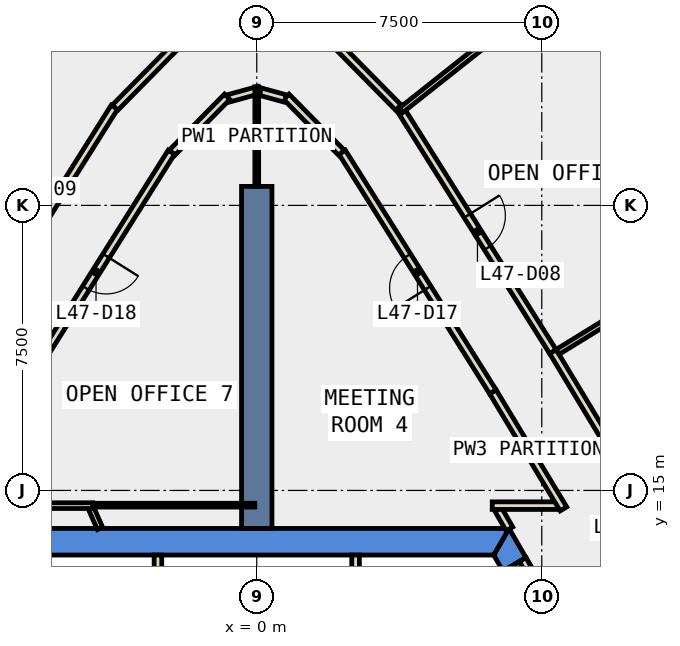
"""IFC4 building model, lengths in metres.
Left out: names, types, materials, properties, quantities, classifications, styles, units other than length and angle.
Written with IfcOpenShell. Run it as: python <this file> out.ifc"""

import sys

from ifc_helpers import new_model, si_unit, direction, frame, frame_2d, origin, place, context, subcontext, project, spatial, polyline, rectangle, outline, extrude, element, fill, save


model = new_model("IFC4")
c1 = context("Model", 3, precision=1e-05, world=origin(), true_north=direction((0.0, 1.0)))
c2 = subcontext(c1, "Body", "Model", "MODEL_VIEW")
j1 = project(units=[si_unit("LENGTHUNIT", "METRE"), si_unit("PLANEANGLEUNIT", "RADIAN")], contexts=[c1])
p1 = place(None, origin())
s1 = spatial("IfcSite", under=j1, at=p1, CompositionType="ELEMENT")
p2 = place(p1, origin())
s2 = spatial("IfcBuilding", under=s1, at=p2, CompositionType="ELEMENT")
p3 = place(p2, frame((0.0, 0.0, 210.8)))
s3 = spatial("IfcBuildingStorey", under=s2, at=p3, CompositionType="ELEMENT", Elevation=210.8)
p4 = place(p3, frame((0.0, 0.0, -0.4)))
e1 = element("IfcWall", 1, at=p4, inside=s3, PredefinedType="SHEAR", context=c2, shape_type="SweptSolid", body=[
    extrude(outline(polyline([(6.478, 12.88), (7.084, 13.23), (6.64, 14.0), (6.235, 13.3), (6.478, 12.88)])), origin(), (0.0, 0.0, 1.0), 4.2),
])
p5 = place(p3, frame((0.0, 0.0, 3.6)))
e2 = element("IfcWall", 2, at=p5, inside=s3, PredefinedType="SHEAR", context=c2, shape_type="SweptSolid", body=[
    extrude(outline(polyline([(7.084, 13.23), (6.478, 12.88), (7.478, 11.148), (8.084, 11.498), (7.084, 13.23)])), origin(), (0.0, 0.0, 1.0), 0.2),
])
p6 = place(p3, frame((0.0, 0.0, -0.4)))
e3 = element("IfcWall", 3, at=p6, inside=s3, PredefinedType="SHEAR", context=c2, shape_type="SweptSolid", body=[
    extrude(outline(polyline([(6.64, 14.0), (-6.64, 14.0), (-6.235, 13.3), (6.235, 13.3), (6.64, 14.0)])), origin(), (0.0, 0.0, 1.0), 4.2),
])
p7 = place(p3, frame((0.0, 14.0, -0.4), z_axis=(0.0, 0.0, 1.0), x_axis=(0.0, 1.0, 0.0)))
e4 = element("IfcWall", 4, at=p7, inside=s3, PredefinedType="SHEAR", context=c2, shape_type="SweptSolid", body=[
    extrude(rectangle(XDim=9.0, YDim=0.8, at=frame_2d((4.5, 0.0))), origin(), (0.0, 0.0, 1.0), 4.2),
])
p8 = place(p3, frame((12.632, 22.134, 0.0), z_axis=(0.0, 0.0, 1.0), x_axis=(-0.532522107002, 0.84641609481, 0.0)))
e5 = element("IfcWall", 5, at=p8, inside=s3, PredefinedType="STANDARD", context=c2, shape_type="SweptSolid", body=[
    extrude(rectangle(XDim=7.273, YDim=0.3, at=frame_2d((3.636, 0.0))), origin(), (0.0, 0.0, 1.0), 3.8),
])
p9 = place(p8, frame((0.618, 0.0, 0.9)))
e6 = element("IfcOpeningElement", 6, at=p9, cuts=e5, PredefinedType="OPENING", context=c2, shape_type="SweptSolid", body=[
    extrude(rectangle(XDim=2.4, YDim=2.6, at=frame_2d((1.2, 1.3))), frame((0.0, 0.16, 0.0), z_axis=(0.0, -1.0, 0.0), x_axis=(1.0, 0.0, 0.0)), (0.0, 0.0, 1.0), 0.32),
])
p10 = place(p8, frame((4.255, 0.0, 0.9)))
e7 = element("IfcOpeningElement", 7, at=p10, cuts=e5, PredefinedType="OPENING", context=c2, shape_type="SweptSolid", body=[
    extrude(rectangle(XDim=2.4, YDim=2.6, at=frame_2d((1.2, 1.3))), frame((0.0, 0.16, 0.0), z_axis=(0.0, -1.0, 0.0), x_axis=(1.0, 0.0, 0.0)), (0.0, 0.0, 1.0), 0.32),
])
p11 = place(p3, frame((6.649, 13.988, 0.0), z_axis=(0.0, 0.0, 1.0), x_axis=(-0.499908430952, 0.866078264744, 0.0)))
e8 = element("IfcWall", 8, at=p11, inside=s3, PredefinedType="PARTITIONING", context=c2, shape_type="SweptSolid", body=[
    extrude(rectangle(XDim=0.606, YDim=0.2, at=frame_2d((0.303, 0.0))), origin(), (0.0, 0.0, 1.0), 3.8),
])
p12 = place(p3, frame((6.196, 14.6, 0.0), z_axis=(0.0, 0.0, 1.0), x_axis=(1.0, 0.0, 0.0)))
e9 = element("IfcWall", 9, at=p12, inside=s3, PredefinedType="PARTITIONING", context=c2, shape_type="SweptSolid", body=[
    extrude(rectangle(XDim=1.722, YDim=0.2, at=frame_2d((0.861, 0.0))), origin(), (0.0, 0.0, 1.0), 3.8),
])
p13 = place(p3, frame((8.07, 14.514, 0.0), z_axis=(0.0, 0.0, 1.0), x_axis=(-0.51624118739, 0.856443247648, 0.0)))
e10 = element("IfcWall", 10, at=p13, inside=s3, PredefinedType="PARTITIONING", context=c2, shape_type="SweptSolid", body=[
    extrude(rectangle(XDim=3.597, YDim=0.2, at=frame_2d((1.799, 0.0))), origin(), (0.0, 0.0, 1.0), 3.8),
])
p14 = place(p3, frame((6.213, 17.595, 0.0), z_axis=(0.0, 0.0, 1.0), x_axis=(-0.532527247309, 0.846412860768, 0.0)))
e11 = element("IfcWall", 11, at=p14, inside=s3, PredefinedType="PARTITIONING", context=c2, shape_type="SweptSolid", body=[
    extrude(rectangle(XDim=7.449, YDim=0.2, at=frame_2d((3.725, 0.0))), origin(), (0.0, 0.0, 1.0), 3.8),
])
p15 = place(p14, frame((3.225, 0.0, 0.0)))
e12 = element("IfcOpeningElement", 12, at=p15, cuts=e11, PredefinedType="OPENING", context=c2, shape_type="SweptSolid", body=[
    extrude(rectangle(XDim=1.0, YDim=2.1, at=frame_2d((0.5, 1.05))), frame((0.0, 0.11, 0.0), z_axis=(0.0, -1.0, 0.0), x_axis=(1.0, 0.0, 0.0)), (0.0, 0.0, 1.0), 0.22),
])
p16 = place(p3, frame((2.229, 23.887, 0.0), z_axis=(0.0, 0.0, 1.0), x_axis=(-0.702245482258, 0.711934886523, 0.0)))
e13 = element("IfcWall", 13, at=p16, inside=s3, PredefinedType="PARTITIONING", context=c2, shape_type="SweptSolid", body=[
    extrude(rectangle(XDim=2.066, YDim=0.2, at=frame_2d((1.033, 0.0))), origin(), (0.0, 0.0, 1.0), 3.8),
])
p17 = place(p3, frame((0.752, 25.313, 0.0), z_axis=(0.0, 0.0, 1.0), x_axis=(-0.964381816756, 0.264514104559, 0.0)))
e14 = element("IfcWall", 14, at=p17, inside=s3, PredefinedType="PARTITIONING", context=c2, shape_type="SweptSolid", body=[
    extrude(rectangle(XDim=0.68, YDim=0.2, at=frame_2d((0.34, 0.0))), origin(), (0.0, 0.0, 1.0), 3.8),
])
p18 = place(p3, frame((0.048, 25.533, 0.0), z_axis=(0.0, 0.0, 1.0), x_axis=(-0.964218556253, -0.265108611286, 0.0)))
e15 = element("IfcWall", 15, at=p18, inside=s3, PredefinedType="PARTITIONING", context=c2, shape_type="SweptSolid", body=[
    extrude(rectangle(XDim=0.83, YDim=0.2, at=frame_2d((0.415, 0.0))), origin(), (0.0, 0.0, 1.0), 3.8),
])
p19 = place(p3, frame((-0.778, 25.358, 0.0), z_axis=(0.0, 0.0, 1.0), x_axis=(-0.702245482258, -0.711934886523, 0.0)))
e16 = element("IfcWall", 16, at=p19, inside=s3, PredefinedType="PARTITIONING", context=c2, shape_type="SweptSolid", body=[
    extrude(rectangle(XDim=2.066, YDim=0.2, at=frame_2d((1.033, 0.0))), origin(), (0.0, 0.0, 1.0), 3.8),
])
p20 = place(p3, frame((-2.246, 23.9, 0.0), z_axis=(0.0, 0.0, 1.0), x_axis=(-0.532527247309, -0.846412860768, 0.0)))
e17 = element("IfcWall", 17, at=p20, inside=s3, PredefinedType="PARTITIONING", context=c2, shape_type="SweptSolid", body=[
    extrude(rectangle(XDim=7.449, YDim=0.2, at=frame_2d((3.725, 0.0))), origin(), (0.0, 0.0, 1.0), 3.8),
])
p21 = place(p20, frame((3.225, 0.0, 0.0)))
e18 = element("IfcOpeningElement", 18, at=p21, cuts=e17, PredefinedType="OPENING", context=c2, shape_type="SweptSolid", body=[
    extrude(rectangle(XDim=1.0, YDim=2.1, at=frame_2d((0.5, 1.05))), frame((0.0, 0.11, 0.0), z_axis=(0.0, -1.0, 0.0), x_axis=(1.0, 0.0, 0.0)), (0.0, 0.0, 1.0), 0.22),
])
p22 = place(p3, frame((7.792, 18.655, 0.0), z_axis=(0.0, 0.0, 1.0), x_axis=(0.516293428925, -0.856411755669, 0.0)))
e19 = element("IfcWall", 19, at=p22, inside=s3, PredefinedType="PARTITIONING", context=c2, shape_type="SweptSolid", body=[
    extrude(rectangle(XDim=8.124, YDim=0.2, at=frame_2d((4.062, 0.0))), origin(), (0.0, 0.0, 1.0), 3.8),
])
p23 = place(p22, frame((3.637, 0.0, 0.0)))
e20 = element("IfcOpeningElement", 20, at=p23, cuts=e19, PredefinedType="OPENING", context=c2, shape_type="SweptSolid", body=[
    extrude(rectangle(XDim=1.0, YDim=2.1, at=frame_2d((0.5, 1.05))), frame((0.0, 0.11, 0.0), z_axis=(0.0, -1.0, 0.0), x_axis=(1.0, 0.0, 0.0)), (0.0, 0.0, 1.0), 0.22),
])
p24 = place(p3, frame((3.744, 25.087, 0.0), z_axis=(0.0, 0.0, 1.0), x_axis=(0.532569549341, -0.846386244639, 0.0)))
e21 = element("IfcWall", 21, at=p24, inside=s3, PredefinedType="PARTITIONING", context=c2, shape_type="SweptSolid", body=[
    extrude(rectangle(XDim=7.599, YDim=0.2, at=frame_2d((3.8, 0.0))), origin(), (0.0, 0.0, 1.0), 3.8),
])
p25 = place(p24, frame((3.375, 0.0, 0.0)))
e22 = element("IfcOpeningElement", 22, at=p25, cuts=e21, PredefinedType="OPENING", context=c2, shape_type="SweptSolid", body=[
    extrude(rectangle(XDim=1.0, YDim=2.1, at=frame_2d((0.5, 1.05))), frame((0.0, 0.11, 0.0), z_axis=(0.0, -1.0, 0.0), x_axis=(1.0, 0.0, 0.0)), (0.0, 0.0, 1.0), 0.22),
])
p26 = place(p3, frame((-7.871, 18.528, 0.0), z_axis=(0.0, 0.0, 1.0), x_axis=(0.532587642146, 0.846374859878, 0.0)))
e23 = element("IfcWall", 23, at=p26, inside=s3, PredefinedType="PARTITIONING", context=c2, shape_type="SweptSolid", body=[
    extrude(rectangle(XDim=7.749, YDim=0.2, at=frame_2d((3.875, 0.0))), origin(), (0.0, 0.0, 1.0), 3.8),
])
p27 = place(p26, frame((3.375, 0.0, 0.0)))
e24 = element("IfcOpeningElement", 24, at=p27, cuts=e23, PredefinedType="OPENING", context=c2, shape_type="SweptSolid", body=[
    extrude(rectangle(XDim=1.0, YDim=2.1, at=frame_2d((0.5, 1.05))), frame((0.0, 0.11, 0.0), z_axis=(0.0, -1.0, 0.0), x_axis=(1.0, 0.0, 0.0)), (0.0, 0.0, 1.0), 0.22),
])
for number, where, z_axis, x_axis in (
    (25, (-3.727, 25.074, 0.0), (0.0, 0.0, 1.0), (0.702, 0.712, 0.0)),
    (26, (1.773, 27.056, 0.0), (0.0, 0.0, 1.0), (0.702, -0.712, 0.0)),
):
    element("IfcWall", number, at=place(p3, frame(where, z_axis=z_axis, x_axis=x_axis)), inside=s3, PredefinedType="PARTITIONING", context=c2, shape_type="SweptSolid", body=[
        extrude(rectangle(XDim=2.783, YDim=0.2, at=frame_2d((1.392, 0.0))), origin(), (0.0, 0.0, 1.0), 3.8),
    ])
p28 = place(p3, frame((-2.6, 10.8, 0.0), z_axis=(0.0, 0.0, 1.0), x_axis=(0.0, 1.0, 0.0)))
e27 = element("IfcWall", 27, at=p28, inside=s3, PredefinedType="PARTITIONING", context=c2, shape_type="SweptSolid", body=[
    extrude(rectangle(XDim=2.5, YDim=0.2, at=frame_2d((1.25, 0.0))), origin(), (0.0, 0.0, 1.0), 3.8),
])
p29 = place(p28, frame((0.75, 0.0, 0.0)))
e28 = element("IfcOpeningElement", 28, at=p29, cuts=e27, PredefinedType="OPENING", context=c2, shape_type="SweptSolid", body=[
    extrude(rectangle(XDim=0.9, YDim=2.1, at=frame_2d((0.45, 1.05))), frame((0.0, 0.11, 0.0), z_axis=(0.0, -1.0, 0.0), x_axis=(1.0, 0.0, 0.0)), (0.0, 0.0, 1.0), 0.22),
])
p30 = place(p3, frame((2.6, 13.3, 0.0), z_axis=(0.0, 0.0, 1.0), x_axis=(0.0, -1.0, 0.0)))
e29 = element("IfcWall", 29, at=p30, inside=s3, PredefinedType="PARTITIONING", context=c2, shape_type="SweptSolid", body=[
    extrude(rectangle(XDim=2.5, YDim=0.2, at=frame_2d((1.25, 0.0))), origin(), (0.0, 0.0, 1.0), 3.8),
])
p31 = place(p3, frame((-4.125, 14.0, 0.0), z_axis=(0.0, 0.0, 1.0), x_axis=(-0.404850841056, 0.914382740703, 0.0)))
e30 = element("IfcWall", 30, at=p31, inside=s3, PredefinedType="PARTITIONING", context=c2, shape_type="SweptSolid", body=[
    extrude(rectangle(XDim=0.581, YDim=0.15, at=frame_2d((0.291, 0.0))), origin(), (0.0, 0.0, 1.0), 3.8),
])
p32 = place(p3, frame((-4.316, 14.6, 0.0), z_axis=(0.0, 0.0, 1.0), x_axis=(-1.0, 0.0, 0.0)))
e31 = element("IfcWall", 31, at=p32, inside=s3, PredefinedType="PARTITIONING", context=c2, shape_type="SweptSolid", body=[
    extrude(rectangle(XDim=3.802, YDim=0.15, at=frame_2d((1.901, 0.0))), origin(), (0.0, 0.0, 1.0), 3.8),
])
p33 = place(p3, frame((-4.316, 14.612, 0.0), z_axis=(0.0, 0.0, 1.0), x_axis=(1.0, 0.0, 0.0)))
e32 = element("IfcWall", 32, at=p33, inside=s3, PredefinedType="PARTITIONING", context=c2, shape_type="SweptSolid", body=[
    extrude(rectangle(XDim=4.266, YDim=0.1, at=frame_2d((2.133, 0.0))), origin(), (0.0, 0.0, 1.0), 3.8),
])
p34 = place(p3, frame((0.0, 23.0, 0.0), z_axis=(0.0, 0.0, 1.0), x_axis=(0.0, 1.0, 0.0)))
e33 = element("IfcWall", 33, at=p34, inside=s3, PredefinedType="PARTITIONING", context=c2, shape_type="SweptSolid", body=[
    extrude(rectangle(XDim=2.62, YDim=0.1, at=frame_2d((1.31, 0.0))), origin(), (0.0, 0.0, 1.0), 3.8),
])
p35 = place(p3, frame((7.916, 18.644, 0.0), z_axis=(0.0, 0.0, 1.0), x_axis=(0.851543444049, 0.524284047914, 0.0)))
e34 = element("IfcWall", 34, at=p35, inside=s3, PredefinedType="PARTITIONING", context=c2, shape_type="SweptSolid", body=[
    extrude(rectangle(XDim=4.379, YDim=0.15, at=frame_2d((2.189, 0.0))), origin(), (0.0, 0.0, 1.0), 3.8),
])
p36 = place(p3, frame((3.797, 25.003, 0.0), z_axis=(0.0, 0.0, 1.0), x_axis=(0.783893371826, 0.620895467536, 0.0)))
e35 = element("IfcWall", 35, at=p36, inside=s3, PredefinedType="PARTITIONING", context=c2, shape_type="SweptSolid", body=[
    extrude(rectangle(XDim=4.514, YDim=0.15, at=frame_2d((2.257, 0.0))), origin(), (0.0, 0.0, 1.0), 3.8),
])
p37 = place(p3, frame((7.997, 11.448, 0.0), z_axis=(0.0, 0.0, 1.0), x_axis=(-0.50002537861, 0.866010750942, 0.0)))
e36 = element("IfcWall", 36, at=p37, inside=s3, PredefinedType="PARTITIONING", context=c2, shape_type="SweptSolid", body=[
    extrude(rectangle(XDim=2.0, YDim=0.2, at=frame_2d((1.0, 0.0))), origin(), (0.0, 0.0, 1.0), 2.4),
])
p38 = place(p37, frame((0.19, 0.0, 0.0)))
e37 = element("IfcOpeningElement", 37, at=p38, cuts=e36, PredefinedType="OPENING", context=c2, shape_type="SweptSolid", body=[
    extrude(rectangle(XDim=1.8, YDim=2.1, at=frame_2d((0.9, 1.05))), frame((0.0, 0.11, 0.0), z_axis=(0.0, -1.0, 0.0), x_axis=(1.0, 0.0, 0.0)), (0.0, 0.0, 1.0), 0.22),
])
p39 = place(p25, origin())
e38 = element("IfcDoor", 38, at=p39, inside=s3, OperationType="SINGLE_SWING_LEFT", PredefinedType="DOOR", context=c2, shape_type="SweptSolid", body=[
    extrude(rectangle(XDim=1.0, YDim=2.1, at=frame_2d((0.5, 1.05))), frame((0.0, 0.025, 0.0), z_axis=(0.0, -1.0, 0.0), x_axis=(1.0, 0.0, 0.0)), (0.0, 0.0, 1.0), 0.05),
])
fill(e22, e38)
p40 = place(p15, origin())
e39 = element("IfcDoor", 39, at=p40, inside=s3, OperationType="SINGLE_SWING_LEFT", PredefinedType="DOOR", context=c2, shape_type="SweptSolid", body=[
    extrude(rectangle(XDim=1.0, YDim=2.1, at=frame_2d((0.5, 1.05))), frame((0.0, 0.025, 0.0), z_axis=(0.0, -1.0, 0.0), x_axis=(1.0, 0.0, 0.0)), (0.0, 0.0, 1.0), 0.05),
])
fill(e12, e39)
p41 = place(p21, origin())
e40 = element("IfcDoor", 40, at=p41, inside=s3, OperationType="SINGLE_SWING_LEFT", PredefinedType="DOOR", context=c2, shape_type="SweptSolid", body=[
    extrude(rectangle(XDim=1.0, YDim=2.1, at=frame_2d((0.5, 1.05))), frame((0.0, 0.025, 0.0), z_axis=(0.0, -1.0, 0.0), x_axis=(1.0, 0.0, 0.0)), (0.0, 0.0, 1.0), 0.05),
])
fill(e18, e40)
p42 = place(p38, origin())
e41 = element("IfcDoor", 41, at=p42, inside=s3, OperationType="DOUBLE_DOOR_SINGLE_SWING", PredefinedType="DOOR", context=c2, shape_type="SweptSolid", body=[
    extrude(rectangle(XDim=1.8, YDim=2.1, at=frame_2d((0.9, 1.05))), frame((0.0, 0.025, 0.0), z_axis=(0.0, -1.0, 0.0), x_axis=(1.0, 0.0, 0.0)), (0.0, 0.0, 1.0), 0.05),
])
fill(e37, e41)
save(model, sys.argv[1])
